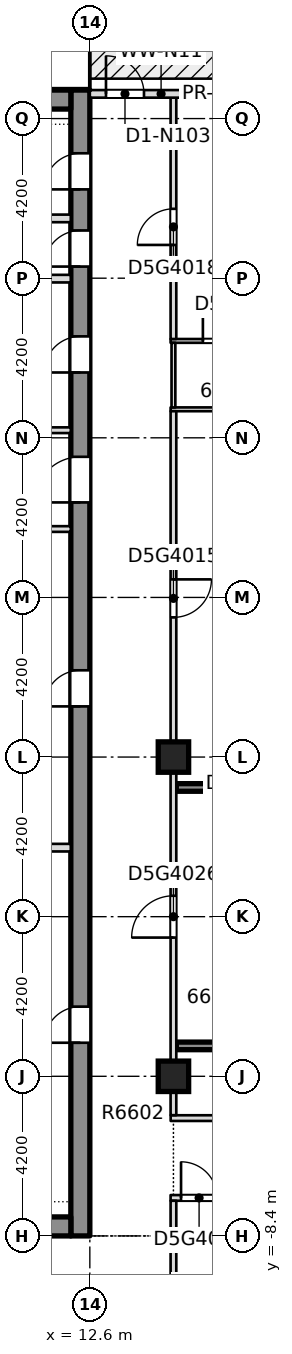
"""IFC4 building model, lengths in metres.
Left out: names, types, materials, properties, quantities, classifications, styles, units other than length and angle.
Written with IfcOpenShell. Run it as: python <this file> out.ifc"""

import sys

from ifc_helpers import new_model, si_unit, direction, frame, frame_2d, origin, origin_2d, place, context, subcontext, project, spatial, rectangle, extrude, element, fill, save


model = new_model("IFC4")
c1 = context("Model", 3, precision=1e-05, world=origin(), true_north=direction((0.0, 1.0)))
c2 = subcontext(c1, "Body", "Model", "MODEL_VIEW")
j1 = project(units=[si_unit("LENGTHUNIT", "METRE"), si_unit("PLANEANGLEUNIT", "RADIAN")], contexts=[c1])
p1 = place(None, origin())
s1 = spatial("IfcSite", under=j1, at=p1, CompositionType="ELEMENT")
p2 = place(p1, origin())
s2 = spatial("IfcBuilding", under=s1, at=p2, CompositionType="ELEMENT")
p3 = place(p2, frame((0.0, 0.0, 251.05)))
s3 = spatial("IfcBuildingStorey", under=s2, at=p3, CompositionType="ELEMENT", Elevation=251.05)
p4 = place(p3, frame((12.35, -8.4, -0.4), z_axis=(0.0, 0.0, 1.0), x_axis=(0.0, 1.0, 0.0)))
e1 = element("IfcWall", 1, at=p4, inside=s3, PredefinedType="SHEAR", context=c2, shape_type="SweptSolid", body=[
    extrude(rectangle(XDim=30.15, YDim=0.5, at=frame_2d((15.075, 0.0))), origin(), (0.0, 0.0, 1.0), 3.45),
])
p5 = place(p4, frame((5.083, 0.0, 0.4)))
e2 = element("IfcOpeningElement", 2, at=p5, cuts=e1, PredefinedType="OPENING", context=c2, shape_type="SweptSolid", body=[
    extrude(rectangle(XDim=0.95, YDim=2.1, at=frame_2d((0.475, 1.05))), frame((0.0, 0.26, 0.0), z_axis=(0.0, -1.0, 0.0), x_axis=(1.0, 0.0, 0.0)), (0.0, 0.0, 1.0), 0.52),
])
p6 = place(p4, frame((13.933, 0.0, 0.4)))
e3 = element("IfcOpeningElement", 3, at=p6, cuts=e1, PredefinedType="OPENING", context=c2, shape_type="SweptSolid", body=[
    extrude(rectangle(XDim=0.95, YDim=2.1, at=frame_2d((0.475, 1.05))), frame((0.0, 0.26, 0.0), z_axis=(0.0, -1.0, 0.0), x_axis=(1.0, 0.0, 0.0)), (0.0, 0.0, 1.0), 0.52),
])
p7 = place(p4, frame((22.719, 0.0, 0.4)))
e4 = element("IfcOpeningElement", 4, at=p7, cuts=e1, PredefinedType="OPENING", context=c2, shape_type="SweptSolid", body=[
    extrude(rectangle(XDim=0.95, YDim=2.1, at=frame_2d((0.475, 1.05))), frame((0.0, 0.26, 0.0), z_axis=(0.0, -1.0, 0.0), x_axis=(1.0, 0.0, 0.0)), (0.0, 0.0, 1.0), 0.52),
])
p8 = place(p4, frame((25.506, 0.0, 0.4)))
e5 = element("IfcOpeningElement", 5, at=p8, cuts=e1, PredefinedType="OPENING", context=c2, shape_type="SweptSolid", body=[
    extrude(rectangle(XDim=0.95, YDim=2.1, at=frame_2d((0.475, 1.05))), frame((0.0, 0.26, 0.0), z_axis=(0.0, -1.0, 0.0), x_axis=(1.0, 0.0, 0.0)), (0.0, 0.0, 1.0), 0.52),
])
p9 = place(p4, frame((27.537, 0.0, 0.4)))
e6 = element("IfcOpeningElement", 6, at=p9, cuts=e1, PredefinedType="OPENING", context=c2, shape_type="SweptSolid", body=[
    extrude(rectangle(XDim=0.95, YDim=2.1, at=frame_2d((0.475, 1.05))), frame((0.0, 0.26, 0.0), z_axis=(0.0, -1.0, 0.0), x_axis=(1.0, 0.0, 0.0)), (0.0, 0.0, 1.0), 0.52),
])
p10 = place(p4, frame((19.3, 0.0, 0.4)))
e7 = element("IfcOpeningElement", 7, at=p10, cuts=e1, PredefinedType="OPENING", context=c2, shape_type="SweptSolid", body=[
    extrude(rectangle(XDim=1.2, YDim=2.1, at=frame_2d((0.6, 1.05))), frame((0.0, 0.26, 0.0), z_axis=(0.0, -1.0, 0.0), x_axis=(1.0, 0.0, 0.0)), (0.0, 0.0, 1.0), 0.52),
])
p11 = place(p3, frame((-12.1, -8.15, -0.4), z_axis=(0.0, 0.0, 1.0), x_axis=(1.0, 0.0, 0.0)))
e8 = element("IfcWall", 8, at=p11, inside=s3, PredefinedType="SHEAR", context=c2, shape_type="SweptSolid", body=[
    extrude(rectangle(XDim=24.2, YDim=0.5, at=frame_2d((12.1, 0.0))), origin(), (0.0, 0.0, 1.0), 3.45),
])
p12 = place(p11, frame((7.35, 0.0, 0.4)))
e9 = element("IfcOpeningElement", 9, at=p12, cuts=e8, PredefinedType="OPENING", context=c2, shape_type="SweptSolid", body=[
    extrude(rectangle(XDim=1.8, YDim=2.1, at=frame_2d((0.9, 1.05))), frame((0.0, 0.26, 0.0), z_axis=(0.0, -1.0, 0.0), x_axis=(1.0, 0.0, 0.0)), (0.0, 0.0, 1.0), 0.52),
])
p13 = place(p11, frame((15.05, 0.0, 0.4)))
e10 = element("IfcOpeningElement", 10, at=p13, cuts=e8, PredefinedType="OPENING", context=c2, shape_type="SweptSolid", body=[
    extrude(rectangle(XDim=1.8, YDim=2.1, at=frame_2d((0.9, 1.05))), frame((0.0, 0.26, 0.0), z_axis=(0.0, -1.0, 0.0), x_axis=(1.0, 0.0, 0.0)), (0.0, 0.0, 1.0), 0.52),
])
p14 = place(p3, frame((-12.1, 21.5, -0.4), z_axis=(0.0, 0.0, 1.0), x_axis=(1.0, 0.0, 0.0)))
e11 = element("IfcWall", 11, at=p14, inside=s3, PredefinedType="SHEAR", context=c2, shape_type="SweptSolid", body=[
    extrude(rectangle(XDim=24.2, YDim=0.5, at=frame_2d((12.1, 0.0))), origin(), (0.0, 0.0, 1.0), 3.45),
])
for number, where, z_axis, x_axis in (
    (12, (14.8, -4.2, -0.4), (0.0, 0.0, 1.0), (1.0, 0.0, 0.0)),
    (13, (14.8, 4.2, -0.4), (0.0, 0.0, 1.0), (1.0, 0.0, 0.0)),
):
    element("IfcColumn", number, at=place(p3, frame(where, z_axis=z_axis, x_axis=x_axis)), inside=s3, PredefinedType="COLUMN", context=c2, shape_type="SweptSolid", body=[
        extrude(rectangle(XDim=0.8, YDim=0.8, at=origin_2d()), origin(), (0.0, 0.0, 1.0), 3.45),
    ])
p15 = place(p3, frame((14.725, -7.4, 0.0), z_axis=(0.0, 0.0, 1.0), x_axis=(1.0, 0.0, 0.0)))
e14 = element("IfcWall", 14, at=p15, inside=s3, PredefinedType="PARTITIONING", context=c2, shape_type="SweptSolid", body=[
    extrude(rectangle(XDim=11.025, YDim=0.15, at=frame_2d((5.512, 0.0))), origin(), (0.0, 0.0, 1.0), 3.05),
])
p16 = place(p15, frame((0.275, 0.0, 0.0)))
e15 = element("IfcOpeningElement", 15, at=p16, cuts=e14, PredefinedType="OPENING", context=c2, shape_type="SweptSolid", body=[
    extrude(rectangle(XDim=0.95, YDim=2.1, at=frame_2d((0.475, 1.05))), frame((0.0, 0.085, 0.0), z_axis=(0.0, -1.0, 0.0), x_axis=(1.0, 0.0, 0.0)), (0.0, 0.0, 1.0), 0.17),
])
p17 = place(p3, frame((14.727, -5.3, 0.0), z_axis=(0.0, 0.0, 1.0), x_axis=(1.0, 0.0, 0.0)))
e16 = element("IfcWall", 16, at=p17, inside=s3, PredefinedType="PARTITIONING", context=c2, shape_type="SweptSolid", body=[
    extrude(rectangle(XDim=11.023, YDim=0.15, at=frame_2d((5.511, 0.0))), origin(), (0.0, 0.0, 1.0), 3.05),
])
p18 = place(p3, frame((14.877, -3.4, 0.0), z_axis=(0.0, 0.0, 1.0), x_axis=(1.0, 0.0, 0.0)))
e17 = element("IfcWall", 17, at=p18, inside=s3, PredefinedType="SOLIDWALL", context=c2, shape_type="SweptSolid", body=[
    extrude(rectangle(XDim=5.571, YDim=0.2, at=frame_2d((2.786, 0.0))), origin(), (0.0, 0.0, 1.0), 3.05),
])
p19 = place(p3, frame((14.875, 3.4, 0.0), z_axis=(0.0, 0.0, 1.0), x_axis=(1.0, 0.0, 0.0)))
e18 = element("IfcWall", 18, at=p19, inside=s3, PredefinedType="SOLIDWALL", context=c2, shape_type="SweptSolid", body=[
    extrude(rectangle(XDim=5.575, YDim=0.2, at=frame_2d((2.788, 0.0))), origin(), (0.0, 0.0, 1.0), 3.05),
])
p20 = place(p3, frame((14.725, 13.35, 0.0), z_axis=(0.0, 0.0, 1.0), x_axis=(1.0, 0.0, 0.0)))
e19 = element("IfcWall", 19, at=p20, inside=s3, PredefinedType="PARTITIONING", context=c2, shape_type="SweptSolid", body=[
    extrude(rectangle(XDim=2.525, YDim=0.1, at=frame_2d((1.262, 0.0))), origin(), (0.0, 0.0, 1.0), 3.05),
])
p21 = place(p3, frame((14.725, 15.15, 0.0), z_axis=(0.0, 0.0, 1.0), x_axis=(1.0, 0.0, 0.0)))
e20 = element("IfcWall", 20, at=p21, inside=s3, PredefinedType="PARTITIONING", context=c2, shape_type="SweptSolid", body=[
    extrude(rectangle(XDim=2.525, YDim=0.1, at=frame_2d((1.262, 0.0))), origin(), (0.0, 0.0, 1.0), 3.05),
])
p22 = place(p21, frame((0.85, 0.0, 0.0)))
e21 = element("IfcOpeningElement", 21, at=p22, cuts=e20, PredefinedType="OPENING", context=c2, shape_type="SweptSolid", body=[
    extrude(rectangle(XDim=0.85, YDim=2.1, at=frame_2d((0.425, 1.05))), frame((0.0, 0.06, 0.0), z_axis=(0.0, -1.0, 0.0), x_axis=(1.0, 0.0, 0.0)), (0.0, 0.0, 1.0), 0.12),
])
p23 = place(p3, frame((14.8, -10.6, 0.0), z_axis=(0.0, 0.0, 1.0), x_axis=(0.0, 1.0, 0.0)))
e22 = element("IfcWall", 22, at=p23, inside=s3, PredefinedType="PARTITIONING", context=c2, shape_type="SweptSolid", body=[
    extrude(rectangle(XDim=3.125, YDim=0.15, at=frame_2d((1.562, 0.0))), origin(), (0.0, 0.0, 1.0), 3.05),
])
p24 = place(p3, frame((14.8, -5.223, 0.0), z_axis=(0.0, 0.0, 1.0), x_axis=(0.0, 1.0, 0.0)))
e23 = element("IfcWall", 23, at=p24, inside=s3, PredefinedType="PARTITIONING", context=c2, shape_type="SweptSolid", body=[
    extrude(rectangle(XDim=18.523, YDim=0.15, at=frame_2d((9.261, 0.0))), origin(), (0.0, 0.0, 1.0), 3.05),
])
p25 = place(p24, frame((13.098, 0.0, 0.0)))
e24 = element("IfcOpeningElement", 24, at=p25, cuts=e23, PredefinedType="OPENING", context=c2, shape_type="SweptSolid", body=[
    extrude(rectangle(XDim=1.0, YDim=2.1, at=frame_2d((0.5, 1.05))), frame((0.0, 0.085, 0.0), z_axis=(0.0, -1.0, 0.0), x_axis=(1.0, 0.0, 0.0)), (0.0, 0.0, 1.0), 0.17),
])
p26 = place(p24, frame((4.673, 0.0, 0.0)))
e25 = element("IfcOpeningElement", 25, at=p26, cuts=e23, PredefinedType="OPENING", context=c2, shape_type="SweptSolid", body=[
    extrude(rectangle(XDim=1.1, YDim=2.1, at=frame_2d((0.55, 1.05))), frame((0.0, 0.085, 0.0), z_axis=(0.0, -1.0, 0.0), x_axis=(1.0, 0.0, 0.0)), (0.0, 0.0, 1.0), 0.17),
])
p27 = place(p3, frame((14.8, 13.4, 0.0), z_axis=(0.0, 0.0, 1.0), x_axis=(0.0, 1.0, 0.0)))
e26 = element("IfcWall", 26, at=p27, inside=s3, PredefinedType="PARTITIONING", context=c2, shape_type="SweptSolid", body=[
    extrude(rectangle(XDim=1.7, YDim=0.1, at=frame_2d((0.85, 0.0))), origin(), (0.0, 0.0, 1.0), 3.05),
])
p28 = place(p3, frame((14.8, 15.2, 0.0), z_axis=(0.0, 0.0, 1.0), x_axis=(0.0, 1.0, 0.0)))
e27 = element("IfcWall", 27, at=p28, inside=s3, PredefinedType="PARTITIONING", context=c2, shape_type="SweptSolid", body=[
    extrude(rectangle(XDim=6.35, YDim=0.15, at=frame_2d((3.175, 0.0))), origin(), (0.0, 0.0, 1.0), 3.05),
])
p29 = place(p28, frame((2.475, 0.0, 0.0)))
e28 = element("IfcOpeningElement", 28, at=p29, cuts=e27, PredefinedType="OPENING", context=c2, shape_type="SweptSolid", body=[
    extrude(rectangle(XDim=0.95, YDim=2.1, at=frame_2d((0.475, 1.05))), frame((0.0, 0.085, 0.0), z_axis=(0.0, -1.0, 0.0), x_axis=(1.0, 0.0, 0.0)), (0.0, 0.0, 1.0), 0.17),
])
p30 = place(p3, frame((16.35, 21.65, 0.0), z_axis=(0.0, 0.0, 1.0), x_axis=(-1.0, 0.0, 0.0)))
e29 = element("IfcWall", 29, at=p30, inside=s3, PredefinedType="STANDARD", context=c2, shape_type="SweptSolid", body=[
    extrude(rectangle(XDim=3.75, YDim=0.2, at=frame_2d((1.875, 0.0))), origin(), (0.0, 0.0, 1.0), 3.05),
])
p31 = place(p30, frame((2.325, 0.0, 0.0)))
e30 = element("IfcOpeningElement", 30, at=p31, cuts=e29, PredefinedType="OPENING", context=c2, shape_type="SweptSolid", body=[
    extrude(rectangle(XDim=1.0, YDim=2.4, at=frame_2d((0.5, 1.2))), frame((0.0, 0.11, 0.0), z_axis=(0.0, -1.0, 0.0), x_axis=(1.0, 0.0, 0.0)), (0.0, 0.0, 1.0), 0.22),
])
p32 = place(p3, frame((8.651, 1.816, 0.0), z_axis=(0.0, 0.0, 1.0), x_axis=(1.0, 0.0, 0.0)))
e31 = element("IfcWall", 31, at=p32, inside=s3, PredefinedType="PARTITIONING", context=c2, shape_type="SweptSolid", body=[
    extrude(rectangle(XDim=3.448, YDim=0.2, at=frame_2d((1.724, 0.0))), origin(), (0.0, 0.0, 1.0), 3.05),
])
for number, where, z_axis, x_axis in (
    (32, (8.651, 10.2, 0.0), (0.0, 0.0, 1.0), (1.0, 0.0, 0.0)),
    (33, (8.651, 12.8, 0.0), (0.0, 0.0, 1.0), (1.0, 0.0, 0.0)),
):
    element("IfcWall", number, at=place(p3, frame(where, z_axis=z_axis, x_axis=x_axis)), inside=s3, PredefinedType="PARTITIONING", context=c2, shape_type="SweptSolid", body=[
        extrude(rectangle(XDim=3.448, YDim=0.15, at=frame_2d((1.724, 0.0))), origin(), (0.0, 0.0, 1.0), 3.05),
    ])
for number, where, z_axis, x_axis in (
    (34, (8.651, 16.788, 0.0), (0.0, 0.0, 1.0), (1.0, 0.0, 0.0)),
    (35, (8.651, 18.373, 0.0), (0.0, 0.0, 1.0), (1.0, 0.0, 0.0)),
):
    element("IfcWall", number, at=place(p3, frame(where, z_axis=z_axis, x_axis=x_axis)), inside=s3, PredefinedType="PARTITIONING", context=c2, shape_type="SweptSolid", body=[
        extrude(rectangle(XDim=3.448, YDim=0.2, at=frame_2d((1.724, 0.0))), origin(), (0.0, 0.0, 1.0), 3.05),
    ])
p33 = place(p16, origin())
e36 = element("IfcDoor", 36, at=p33, inside=s3, OperationType="SINGLE_SWING_RIGHT", PredefinedType="DOOR", context=c2, shape_type="SweptSolid", body=[
    extrude(rectangle(XDim=0.95, YDim=2.1, at=frame_2d((0.475, 1.05))), frame((0.0, 0.025, 0.0), z_axis=(0.0, -1.0, 0.0), x_axis=(1.0, 0.0, 0.0)), (0.0, 0.0, 1.0), 0.05),
])
fill(e15, e36)
p34 = place(p25, origin())
e37 = element("IfcDoor", 37, at=p34, inside=s3, OperationType="SINGLE_SWING_RIGHT", PredefinedType="DOOR", context=c2, shape_type="SweptSolid", body=[
    extrude(rectangle(XDim=1.0, YDim=2.1, at=frame_2d((0.5, 1.05))), frame((0.0, 0.025, 0.0), z_axis=(0.0, -1.0, 0.0), x_axis=(1.0, 0.0, 0.0)), (0.0, 0.0, 1.0), 0.05),
])
fill(e24, e37)
p35 = place(p29, origin())
e38 = element("IfcDoor", 38, at=p35, inside=s3, OperationType="SINGLE_SWING_LEFT", PredefinedType="DOOR", context=c2, shape_type="SweptSolid", body=[
    extrude(rectangle(XDim=0.95, YDim=2.1, at=frame_2d((0.475, 1.05))), frame((0.0, 0.025, 0.0), z_axis=(0.0, -1.0, 0.0), x_axis=(1.0, 0.0, 0.0)), (0.0, 0.0, 1.0), 0.05),
])
fill(e28, e38)
p36 = place(p22, origin())
e39 = element("IfcDoor", 39, at=p36, inside=s3, OperationType="SINGLE_SWING_RIGHT", PredefinedType="DOOR", context=c2, shape_type="SweptSolid", body=[
    extrude(rectangle(XDim=0.85, YDim=2.1, at=frame_2d((0.425, 1.05))), frame((0.0, 0.025, 0.0), z_axis=(0.0, -1.0, 0.0), x_axis=(1.0, 0.0, 0.0)), (0.0, 0.0, 1.0), 0.05),
])
fill(e21, e39)
p37 = place(p26, origin())
e40 = element("IfcDoor", 40, at=p37, inside=s3, OperationType="SINGLE_SWING_RIGHT", PredefinedType="DOOR", context=c2, shape_type="SweptSolid", body=[
    extrude(rectangle(XDim=1.1, YDim=2.1, at=frame_2d((0.55, 1.05))), frame((0.0, 0.025, 0.0), z_axis=(0.0, -1.0, 0.0), x_axis=(1.0, 0.0, 0.0)), (0.0, 0.0, 1.0), 0.05),
])
fill(e25, e40)
p38 = place(p31, origin())
e41 = element("IfcDoor", 41, at=p38, inside=s3, OperationType="SINGLE_SWING_LEFT", PredefinedType="DOOR", context=c2, shape_type="SweptSolid", body=[
    extrude(rectangle(XDim=1.0, YDim=2.4, at=frame_2d((0.5, 1.2))), frame((0.0, 0.025, 0.0), z_axis=(0.0, -1.0, 0.0), x_axis=(1.0, 0.0, 0.0)), (0.0, 0.0, 1.0), 0.05),
])
fill(e30, e41)
p39 = place(p5, origin())
e42 = element("IfcDoor", 42, at=p39, inside=s3, OperationType="SINGLE_SWING_LEFT", PredefinedType="DOOR", context=c2, shape_type="SweptSolid", body=[
    extrude(rectangle(XDim=0.95, YDim=2.1, at=frame_2d((0.475, 1.05))), frame((0.0, 0.025, 0.0), z_axis=(0.0, -1.0, 0.0), x_axis=(1.0, 0.0, 0.0)), (0.0, 0.0, 1.0), 0.05),
])
fill(e2, e42)
p40 = place(p6, origin())
e43 = element("IfcDoor", 43, at=p40, inside=s3, OperationType="SINGLE_SWING_LEFT", PredefinedType="DOOR", context=c2, shape_type="SweptSolid", body=[
    extrude(rectangle(XDim=0.95, YDim=2.1, at=frame_2d((0.475, 1.05))), frame((0.0, 0.025, 0.0), z_axis=(0.0, -1.0, 0.0), x_axis=(1.0, 0.0, 0.0)), (0.0, 0.0, 1.0), 0.05),
])
fill(e3, e43)
p41 = place(p7, origin())
e44 = element("IfcDoor", 44, at=p41, inside=s3, OperationType="SINGLE_SWING_LEFT", PredefinedType="DOOR", context=c2, shape_type="SweptSolid", body=[
    extrude(rectangle(XDim=0.95, YDim=2.1, at=frame_2d((0.475, 1.05))), frame((0.0, 0.025, 0.0), z_axis=(0.0, -1.0, 0.0), x_axis=(1.0, 0.0, 0.0)), (0.0, 0.0, 1.0), 0.05),
])
fill(e4, e44)
p42 = place(p8, origin())
e45 = element("IfcDoor", 45, at=p42, inside=s3, OperationType="SINGLE_SWING_LEFT", PredefinedType="DOOR", context=c2, shape_type="SweptSolid", body=[
    extrude(rectangle(XDim=0.95, YDim=2.1, at=frame_2d((0.475, 1.05))), frame((0.0, 0.025, 0.0), z_axis=(0.0, -1.0, 0.0), x_axis=(1.0, 0.0, 0.0)), (0.0, 0.0, 1.0), 0.05),
])
fill(e5, e45)
p43 = place(p9, origin())
e46 = element("IfcDoor", 46, at=p43, inside=s3, OperationType="SINGLE_SWING_LEFT", PredefinedType="DOOR", context=c2, shape_type="SweptSolid", body=[
    extrude(rectangle(XDim=0.95, YDim=2.1, at=frame_2d((0.475, 1.05))), frame((0.0, 0.025, 0.0), z_axis=(0.0, -1.0, 0.0), x_axis=(1.0, 0.0, 0.0)), (0.0, 0.0, 1.0), 0.05),
])
fill(e6, e46)
p44 = place(p10, origin())
e47 = element("IfcDoor", 47, at=p44, inside=s3, OperationType="SINGLE_SWING_LEFT", PredefinedType="DOOR", context=c2, shape_type="SweptSolid", body=[
    extrude(rectangle(XDim=1.2, YDim=2.1, at=frame_2d((0.6, 1.05))), frame((0.0, 0.025, 0.0), z_axis=(0.0, -1.0, 0.0), x_axis=(1.0, 0.0, 0.0)), (0.0, 0.0, 1.0), 0.05),
])
fill(e7, e47)
save(model, sys.argv[1])
